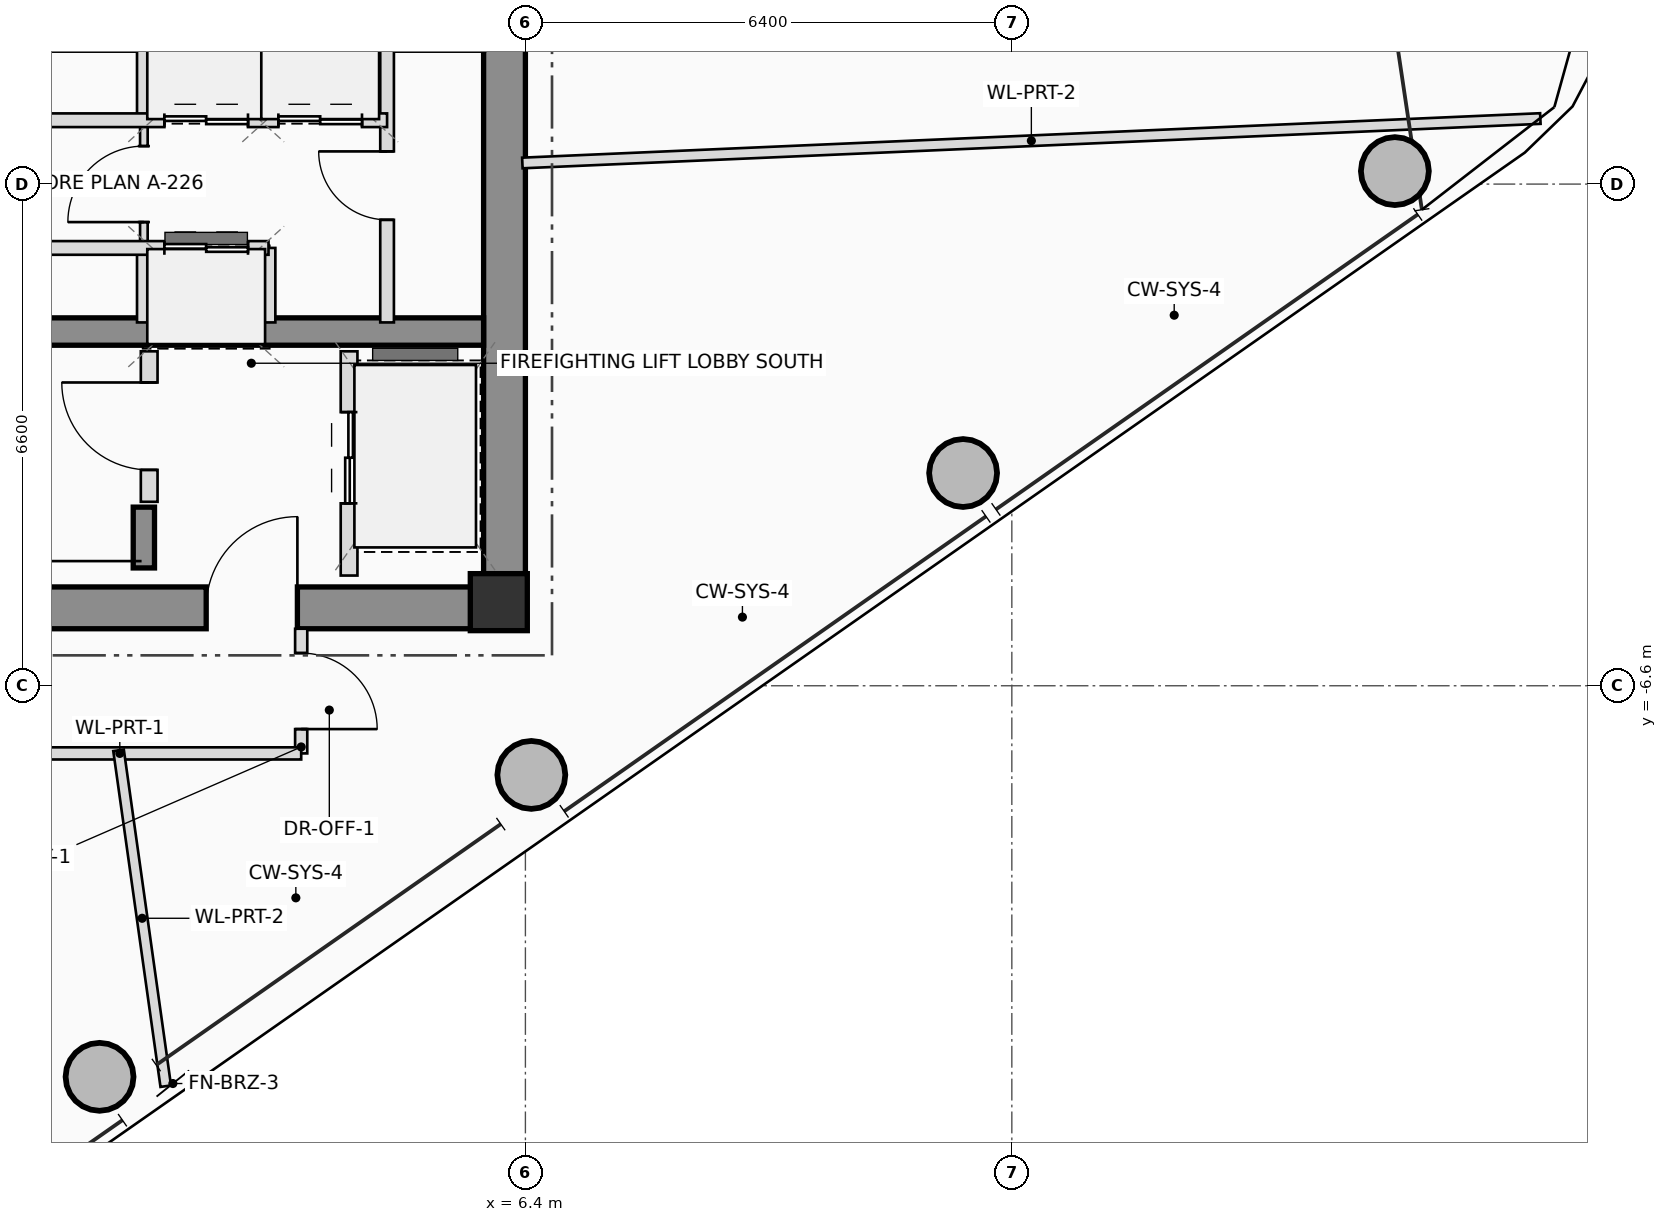
"""IFC4 building model, lengths in metres.
Left out: names, types, materials, properties, quantities, classifications, styles, units other than length and angle.
Written with IfcOpenShell. Run it as: python <this file> out.ifc"""

import sys

from ifc_helpers import new_model, si_unit, direction, frame, frame_2d, origin, origin_2d, place, context, subcontext, project, spatial, rectangle, hollow_circle, extrude, source, transform, mapped, element, fill, save


model = new_model("IFC4")
c1 = context("Model", 3, precision=1e-05, world=origin(), true_north=direction((0.0, 1.0)))
c2 = subcontext(c1, "Body", "Model", "MODEL_VIEW")
j1 = project(units=[si_unit("LENGTHUNIT", "METRE"), si_unit("PLANEANGLEUNIT", "RADIAN")], contexts=[c1])
p1 = place(None, origin())
s1 = spatial("IfcSite", under=j1, at=p1, CompositionType="ELEMENT")
p2 = place(p1, origin())
s2 = spatial("IfcBuilding", under=s1, at=p2, CompositionType="ELEMENT")
p3 = place(p2, frame((0.0, 0.0, 281.35)))
s3 = spatial("IfcBuildingStorey", under=s2, at=p3, CompositionType="ELEMENT", Elevation=281.35)
m1 = source(origin(), c2, "Body", "SweptSolid", [
    extrude(rectangle(XDim=0.75, YDim=0.75, at=origin_2d()), origin(), (0.0, 0.0, 1.0), 3.4),
])
p4 = place(p3, frame((6.05, -5.5, 0.0), z_axis=(0.0, 0.0, 1.0), x_axis=(1.0, 0.0, 0.0)))
e1 = element("IfcColumn", 1, at=p4, inside=s3, PredefinedType="COLUMN", context=c2, shape_type="MappedRepresentation", body=[
    mapped(m1, transform((0.0, 0.0, 0.0), scale=1.0)),
])
p5 = place(p3, frame((-6.4, -5.575, 0.0), z_axis=(0.0, 0.0, 1.0), x_axis=(1.0, 0.0, 0.0)))
e2 = element("IfcWall", 2, at=p5, inside=s3, PredefinedType="SHEAR", context=c2, shape_type="SweptSolid", body=[
    extrude(rectangle(XDim=12.8, YDim=0.55, at=frame_2d((6.4, 0.0))), origin(), (0.0, 0.0, 1.0), 3.4),
])
p6 = place(p5, frame((8.6, 0.0, 0.0)))
e3 = element("IfcOpeningElement", 3, at=p6, cuts=e2, PredefinedType="OPENING", context=c2, shape_type="SweptSolid", body=[
    extrude(rectangle(XDim=1.2, YDim=2.2, at=frame_2d((0.6, 1.1))), frame((0.0, 0.285, 0.0), z_axis=(0.0, -1.0, 0.0), x_axis=(1.0, 0.0, 0.0)), (0.0, 0.0, 1.0), 0.57),
])
p7 = place(p3, frame((6.125, -5.3, 0.0), z_axis=(0.0, 0.0, 1.0), x_axis=(0.0, 1.0, 0.0)))
e4 = element("IfcWall", 4, at=p7, inside=s3, PredefinedType="SHEAR", context=c2, shape_type="SweptSolid", body=[
    extrude(rectangle(XDim=10.6, YDim=0.55, at=frame_2d((5.3, 0.0))), origin(), (0.0, 0.0, 1.0), 3.4),
])
p8 = place(p3, frame((-5.85, -1.94, 0.0), z_axis=(0.0, 0.0, 1.0), x_axis=(1.0, 0.0, 0.0)))
e5 = element("IfcWall", 5, at=p8, inside=s3, PredefinedType="SHEAR", context=c2, shape_type="SweptSolid", body=[
    extrude(rectangle(XDim=11.7, YDim=0.36, at=frame_2d((5.85, 0.0))), origin(), (0.0, 0.0, 1.0), 3.4),
])
p9 = place(p3, frame((1.38, -5.05, 0.0), z_axis=(0.0, 0.0, 1.0), x_axis=(0.0, 1.0, 0.0)))
e6 = element("IfcWall", 6, at=p9, inside=s3, PredefinedType="SHEAR", context=c2, shape_type="SweptSolid", body=[
    extrude(rectangle(XDim=0.8, YDim=0.28, at=frame_2d((0.4, 0.0))), origin(), (0.0, 0.0, 1.0), 3.4),
])
m2 = source(origin(), c2, "Body", "SweptSolid", [
    extrude(hollow_circle(Radius=0.45, WallThickness=0.032, at=origin_2d()), origin(), (0.0, 0.0, 1.0), 3.4),
])
for number, where, z_axis, x_axis in (
    (7, (0.797, -11.745, 0.0), (0.0, 0.0, 1.0), (1.0, 0.0, 0.0)),
    (8, (6.478, -7.773, 0.0), (0.0, 0.0, 1.0), (1.0, 0.0, 0.0)),
    (9, (12.159, -3.801, 0.0), (0.0, 0.0, 1.0), (1.0, 0.0, 0.0)),
    (10, (17.84, 0.171, 0.0), (0.0, 0.0, 1.0), (1.0, 0.0, 0.0)),
):
    element("IfcColumn", number, at=place(p3, frame(where, z_axis=z_axis, x_axis=x_axis)), inside=s3, PredefinedType="COLUMN", context=c2, shape_type="MappedRepresentation", body=[
        mapped(m2, transform((0.0, 0.0, 0.0), scale=1.0)),
    ])
p10 = place(p3, frame((1.45, -4.18, 0.0), z_axis=(0.0, 0.0, 1.0), x_axis=(0.0, 1.0, 0.0)))
e11 = element("IfcWall", 11, at=p10, inside=s3, PredefinedType="PLUMBINGWALL", context=c2, shape_type="SweptSolid", body=[
    extrude(rectangle(XDim=1.98, YDim=0.22, at=frame_2d((0.99, 0.0))), origin(), (0.0, 0.0, 1.0), 3.16),
])
p11 = place(p10, frame((0.42, 0.0, 0.0)))
e12 = element("IfcOpeningElement", 12, at=p11, cuts=e11, PredefinedType="OPENING", context=c2, shape_type="SweptSolid", body=[
    extrude(rectangle(XDim=1.15, YDim=2.15, at=frame_2d((0.575, 1.075))), frame((0.0, 0.12, 0.0), z_axis=(0.0, -1.0, 0.0), x_axis=(1.0, 0.0, 0.0)), (0.0, 0.0, 1.0), 0.24),
])
p12 = place(p3, frame((4.08, -5.15, 0.0), z_axis=(0.0, 0.0, 1.0), x_axis=(0.0, 1.0, 0.0)))
e13 = element("IfcWall", 13, at=p12, inside=s3, PredefinedType="PLUMBINGWALL", context=c2, shape_type="SweptSolid", body=[
    extrude(rectangle(XDim=2.95, YDim=0.22, at=frame_2d((1.475, 0.0))), origin(), (0.0, 0.0, 1.0), 3.16),
])
p13 = place(p12, frame((0.95, 0.0, 0.0)))
e14 = element("IfcOpeningElement", 14, at=p13, cuts=e13, PredefinedType="OPENING", context=c2, shape_type="SweptSolid", body=[
    extrude(rectangle(XDim=1.2, YDim=2.25, at=frame_2d((0.6, 1.125))), frame((0.0, 0.12, 0.0), z_axis=(0.0, -1.0, 0.0), x_axis=(1.0, 0.0, 0.0)), (0.0, 0.0, 1.0), 0.24),
])
p14 = place(p3, frame((1.38, -0.84, 0.0), z_axis=(0.0, 0.0, 1.0), x_axis=(0.0, 1.0, 0.0)))
e15 = element("IfcWall", 15, at=p14, inside=s3, PredefinedType="PARTITIONING", context=c2, shape_type="SweptSolid", body=[
    extrude(rectangle(XDim=1.68, YDim=0.1, at=frame_2d((0.84, 0.0))), origin(), (0.0, 0.0, 1.0), 3.16),
])
p15 = place(p14, frame((0.34, 0.0, 0.0)))
e16 = element("IfcOpeningElement", 16, at=p15, cuts=e15, PredefinedType="OPENING", context=c2, shape_type="SweptSolid", body=[
    extrude(rectangle(XDim=1.0, YDim=2.25, at=frame_2d((0.5, 1.125))), frame((0.0, 0.06, 0.0), z_axis=(0.0, -1.0, 0.0), x_axis=(1.0, 0.0, 0.0)), (0.0, 0.0, 1.0), 0.12),
])
for number, where, z_axis, x_axis in (
    (17, (1.38, 0.84, 0.0), (0.0, 0.0, 1.0), (0.0, 1.0, 0.0)),
    (18, (1.38, -1.82, 0.0), (0.0, 0.0, 1.0), (0.0, 1.0, 0.0)),
    (19, (3.02, 0.84, 0.0), (0.0, 0.0, 1.0), (0.0, 1.0, 0.0)),
    (20, (4.38, 0.84, 0.0), (0.0, 0.0, 1.0), (0.0, 1.0, 0.0)),
    (21, (3.02, -1.82, 0.0), (0.0, 0.0, 1.0), (0.0, 1.0, 0.0)),
):
    element("IfcWall", number, at=place(p3, frame(where, z_axis=z_axis, x_axis=x_axis)), inside=s3, PredefinedType="PLUMBINGWALL", context=c2, shape_type="SweptSolid", body=[
        extrude(rectangle(XDim=0.98, YDim=0.18, at=frame_2d((0.49, 0.0))), origin(), (0.0, 0.0, 1.0), 3.16),
    ])
p16 = place(p3, frame((4.58, -1.82, 0.0), z_axis=(0.0, 0.0, 1.0), x_axis=(0.0, 1.0, 0.0)))
e22 = element("IfcWall", 22, at=p16, inside=s3, PredefinedType="PLUMBINGWALL", context=c2, shape_type="SweptSolid", body=[
    extrude(rectangle(XDim=3.64, YDim=0.18, at=frame_2d((1.82, 0.0))), origin(), (0.0, 0.0, 1.0), 3.16),
])
p17 = place(p16, frame((1.35, 0.0, 0.0)))
e23 = element("IfcOpeningElement", 23, at=p17, cuts=e22, PredefinedType="OPENING", context=c2, shape_type="SweptSolid", body=[
    extrude(rectangle(XDim=0.9, YDim=2.05, at=frame_2d((0.45, 1.025))), frame((0.0, 0.1, 0.0), z_axis=(0.0, -1.0, 0.0), x_axis=(1.0, 0.0, 0.0)), (0.0, 0.0, 1.0), 0.2),
])
p18 = place(p3, frame((-5.68, 0.84, 0.0), z_axis=(0.0, 0.0, 1.0), x_axis=(1.0, 0.0, 0.0)))
e24 = element("IfcWall", 24, at=p18, inside=s3, PredefinedType="PLUMBINGWALL", context=c2, shape_type="SweptSolid", body=[
    extrude(rectangle(XDim=10.26, YDim=0.18, at=frame_2d((5.13, 0.0))), origin(), (0.0, 0.0, 1.0), 3.16),
])
p19 = place(p18, frame((0.91, 0.0, 0.0)))
e25 = element("IfcOpeningElement", 25, at=p19, cuts=e24, PredefinedType="OPENING", context=c2, shape_type="SweptSolid", body=[
    extrude(rectangle(XDim=0.9, YDim=2.05, at=frame_2d((0.45, 1.025))), frame((0.0, 0.1, 0.0), z_axis=(0.0, -1.0, 0.0), x_axis=(1.0, 0.0, 0.0)), (0.0, 0.0, 1.0), 0.2),
])
p20 = place(p18, frame((4.38, 0.0, 0.0)))
e26 = element("IfcOpeningElement", 26, at=p20, cuts=e24, PredefinedType="OPENING", context=c2, shape_type="SweptSolid", body=[
    extrude(rectangle(XDim=0.9, YDim=2.05, at=frame_2d((0.45, 1.025))), frame((0.0, 0.1, 0.0), z_axis=(0.0, -1.0, 0.0), x_axis=(1.0, 0.0, 0.0)), (0.0, 0.0, 1.0), 0.2),
])
p21 = place(p18, frame((7.33, 0.0, 0.0)))
e27 = element("IfcOpeningElement", 27, at=p21, cuts=e24, PredefinedType="OPENING", context=c2, shape_type="SweptSolid", body=[
    extrude(rectangle(XDim=1.1, YDim=2.2, at=frame_2d((0.55, 1.1))), frame((0.0, 0.1, 0.0), z_axis=(0.0, -1.0, 0.0), x_axis=(1.0, 0.0, 0.0)), (0.0, 0.0, 1.0), 0.2),
])
p22 = place(p18, frame((8.83, 0.0, 0.0)))
e28 = element("IfcOpeningElement", 28, at=p22, cuts=e24, PredefinedType="OPENING", context=c2, shape_type="SweptSolid", body=[
    extrude(rectangle(XDim=1.1, YDim=2.2, at=frame_2d((0.55, 1.1))), frame((0.0, 0.1, 0.0), z_axis=(0.0, -1.0, 0.0), x_axis=(1.0, 0.0, 0.0)), (0.0, 0.0, 1.0), 0.2),
])
p23 = place(p3, frame((-5.68, -0.84, 0.0), z_axis=(0.0, 0.0, 1.0), x_axis=(1.0, 0.0, 0.0)))
e29 = element("IfcWall", 29, at=p23, inside=s3, PredefinedType="PLUMBINGWALL", context=c2, shape_type="SweptSolid", body=[
    extrude(rectangle(XDim=8.7, YDim=0.18, at=frame_2d((4.35, 0.0))), origin(), (0.0, 0.0, 1.0), 3.16),
])
p24 = place(p23, frame((3.13, 0.0, 0.0)))
e30 = element("IfcOpeningElement", 30, at=p24, cuts=e29, PredefinedType="OPENING", context=c2, shape_type="SweptSolid", body=[
    extrude(rectangle(XDim=0.9, YDim=2.05, at=frame_2d((0.45, 1.025))), frame((0.0, 0.1, 0.0), z_axis=(0.0, -1.0, 0.0), x_axis=(1.0, 0.0, 0.0)), (0.0, 0.0, 1.0), 0.2),
])
p25 = place(p23, frame((7.33, 0.0, 0.0)))
e31 = element("IfcOpeningElement", 31, at=p25, cuts=e29, PredefinedType="OPENING", context=c2, shape_type="SweptSolid", body=[
    extrude(rectangle(XDim=1.1, YDim=2.2, at=frame_2d((0.55, 1.1))), frame((0.0, 0.1, 0.0), z_axis=(0.0, -1.0, 0.0), x_axis=(1.0, 0.0, 0.0)), (0.0, 0.0, 1.0), 0.2),
])
p26 = place(p3, frame((3.45, -5.85, 0.0), z_axis=(0.0, 0.0, 1.0), x_axis=(0.0, -1.0, 0.0)))
e32 = element("IfcWall", 32, at=p26, inside=s3, PredefinedType="PARTITIONING", context=c2, shape_type="SweptSolid", body=[
    extrude(rectangle(XDim=1.64, YDim=0.16, at=frame_2d((0.82, 0.0))), origin(), (0.0, 0.0, 1.0), 3.16),
])
p27 = place(p26, frame((0.32, 0.0, 0.0)))
e33 = element("IfcOpeningElement", 33, at=p27, cuts=e32, PredefinedType="OPENING", context=c2, shape_type="SweptSolid", body=[
    extrude(rectangle(XDim=1.0, YDim=2.25, at=frame_2d((0.5, 1.125))), frame((0.0, 0.09, 0.0), z_axis=(0.0, -1.0, 0.0), x_axis=(1.0, 0.0, 0.0)), (0.0, 0.0, 1.0), 0.18),
])
p28 = place(p3, frame((3.45, -7.49, 0.0), z_axis=(0.0, 0.0, 1.0), x_axis=(-1.0, 0.0, 0.0)))
e34 = element("IfcWall", 34, at=p28, inside=s3, PredefinedType="PARTITIONING", context=c2, shape_type="SweptSolid", body=[
    extrude(rectangle(XDim=9.81, YDim=0.16, at=frame_2d((4.905, 0.0))), origin(), (0.0, 0.0, 1.0), 2.565),
])
p29 = place(p28, frame((4.923, 0.0, 0.0)))
e35 = element("IfcOpeningElement", 35, at=p29, cuts=e34, PredefinedType="OPENING", context=c2, shape_type="SweptSolid", body=[
    extrude(rectangle(XDim=1.0, YDim=2.25, at=frame_2d((0.5, 1.125))), frame((0.0, 0.09, 0.0), z_axis=(0.0, -1.0, 0.0), x_axis=(1.0, 0.0, 0.0)), (0.0, 0.0, 1.0), 0.18),
])
p30 = place(p3, frame((6.36, 0.278, 0.0), z_axis=(0.0, 0.0, 1.0), x_axis=(0.999047617824, 0.043633213494, 0.0)))
e36 = element("IfcWall", 36, at=p30, inside=s3, PredefinedType="PARTITIONING", context=c2, shape_type="SweptSolid", body=[
    extrude(rectangle(XDim=13.406, YDim=0.14, at=frame_2d((6.703, 0.0))), origin(), (0.0, 0.0, 1.0), 2.565),
])
p31 = place(p3, frame((1.047, -7.45, 0.0), z_axis=(0.0, 0.0, 1.0), x_axis=(0.139153381551, -0.990270839924, 0.0)))
e37 = element("IfcWall", 37, at=p31, inside=s3, PredefinedType="PARTITIONING", context=c2, shape_type="SweptSolid", body=[
    extrude(rectangle(XDim=4.462, YDim=0.14, at=frame_2d((2.231, 0.0))), origin(), (0.0, 0.0, 1.0), 2.565),
])
p32 = place(p6, origin())
e38 = element("IfcDoor", 38, at=p32, inside=s3, OperationType="SINGLE_SWING_RIGHT", PredefinedType="DOOR", context=c2, shape_type="SweptSolid", body=[
    extrude(rectangle(XDim=1.2, YDim=2.2, at=frame_2d((0.6, 1.1))), frame((0.0, 0.025, 0.0), z_axis=(0.0, -1.0, 0.0), x_axis=(1.0, 0.0, 0.0)), (0.0, 0.0, 1.0), 0.05),
])
fill(e3, e38)
p33 = place(p11, origin())
e39 = element("IfcDoor", 39, at=p33, inside=s3, OperationType="SINGLE_SWING_RIGHT", PredefinedType="DOOR", context=c2, shape_type="SweptSolid", body=[
    extrude(rectangle(XDim=1.15, YDim=2.15, at=frame_2d((0.575, 1.075))), frame((0.0, 0.025, 0.0), z_axis=(0.0, -1.0, 0.0), x_axis=(1.0, 0.0, 0.0)), (0.0, 0.0, 1.0), 0.05),
])
fill(e12, e39)
p34 = place(p13, origin())
e40 = element("IfcDoor", 40, at=p34, inside=s3, OperationType="DOUBLE_DOOR_SLIDING", PredefinedType="DOOR", context=c2, shape_type="SweptSolid", body=[
    extrude(rectangle(XDim=1.2, YDim=2.25, at=frame_2d((0.6, 1.125))), frame((0.0, 0.025, 0.0), z_axis=(0.0, -1.0, 0.0), x_axis=(1.0, 0.0, 0.0)), (0.0, 0.0, 1.0), 0.05),
])
fill(e14, e40)
p35 = place(p15, origin())
e41 = element("IfcDoor", 41, at=p35, inside=s3, OperationType="SINGLE_SWING_LEFT", PredefinedType="DOOR", context=c2, shape_type="SweptSolid", body=[
    extrude(rectangle(XDim=1.0, YDim=2.25, at=frame_2d((0.5, 1.125))), frame((0.0, 0.025, 0.0), z_axis=(0.0, -1.0, 0.0), x_axis=(1.0, 0.0, 0.0)), (0.0, 0.0, 1.0), 0.05),
])
fill(e16, e41)
p36 = place(p17, origin())
e42 = element("IfcDoor", 42, at=p36, inside=s3, OperationType="SINGLE_SWING_RIGHT", PredefinedType="DOOR", context=c2, shape_type="SweptSolid", body=[
    extrude(rectangle(XDim=0.9, YDim=2.05, at=frame_2d((0.45, 1.025))), frame((0.0, 0.025, 0.0), z_axis=(0.0, -1.0, 0.0), x_axis=(1.0, 0.0, 0.0)), (0.0, 0.0, 1.0), 0.05),
])
fill(e23, e42)
p37 = place(p21, origin())
e43 = element("IfcDoor", 43, at=p37, inside=s3, OperationType="DOUBLE_DOOR_SLIDING", PredefinedType="DOOR", context=c2, shape_type="SweptSolid", body=[
    extrude(rectangle(XDim=1.1, YDim=2.2, at=frame_2d((0.55, 1.1))), frame((0.0, 0.025, 0.0), z_axis=(0.0, -1.0, 0.0), x_axis=(1.0, 0.0, 0.0)), (0.0, 0.0, 1.0), 0.05),
])
fill(e27, e43)
p38 = place(p22, origin())
e44 = element("IfcDoor", 44, at=p38, inside=s3, OperationType="DOUBLE_DOOR_SLIDING", PredefinedType="DOOR", context=c2, shape_type="SweptSolid", body=[
    extrude(rectangle(XDim=1.1, YDim=2.2, at=frame_2d((0.55, 1.1))), frame((0.0, 0.025, 0.0), z_axis=(0.0, -1.0, 0.0), x_axis=(1.0, 0.0, 0.0)), (0.0, 0.0, 1.0), 0.05),
])
fill(e28, e44)
p39 = place(p25, origin())
e45 = element("IfcDoor", 45, at=p39, inside=s3, OperationType="DOUBLE_DOOR_SLIDING", PredefinedType="DOOR", context=c2, shape_type="SweptSolid", body=[
    extrude(rectangle(XDim=1.1, YDim=2.2, at=frame_2d((0.55, 1.1))), frame((0.0, 0.025, 0.0), z_axis=(0.0, -1.0, 0.0), x_axis=(1.0, 0.0, 0.0)), (0.0, 0.0, 1.0), 0.05),
])
fill(e31, e45)
p40 = place(p27, origin())
e46 = element("IfcDoor", 46, at=p40, inside=s3, OperationType="SINGLE_SWING_RIGHT", PredefinedType="DOOR", context=c2, shape_type="SweptSolid", body=[
    extrude(rectangle(XDim=1.0, YDim=2.25, at=frame_2d((0.5, 1.125))), frame((0.0, 0.025, 0.0), z_axis=(0.0, -1.0, 0.0), x_axis=(1.0, 0.0, 0.0)), (0.0, 0.0, 1.0), 0.05),
])
fill(e33, e46)
save(model, sys.argv[1])
